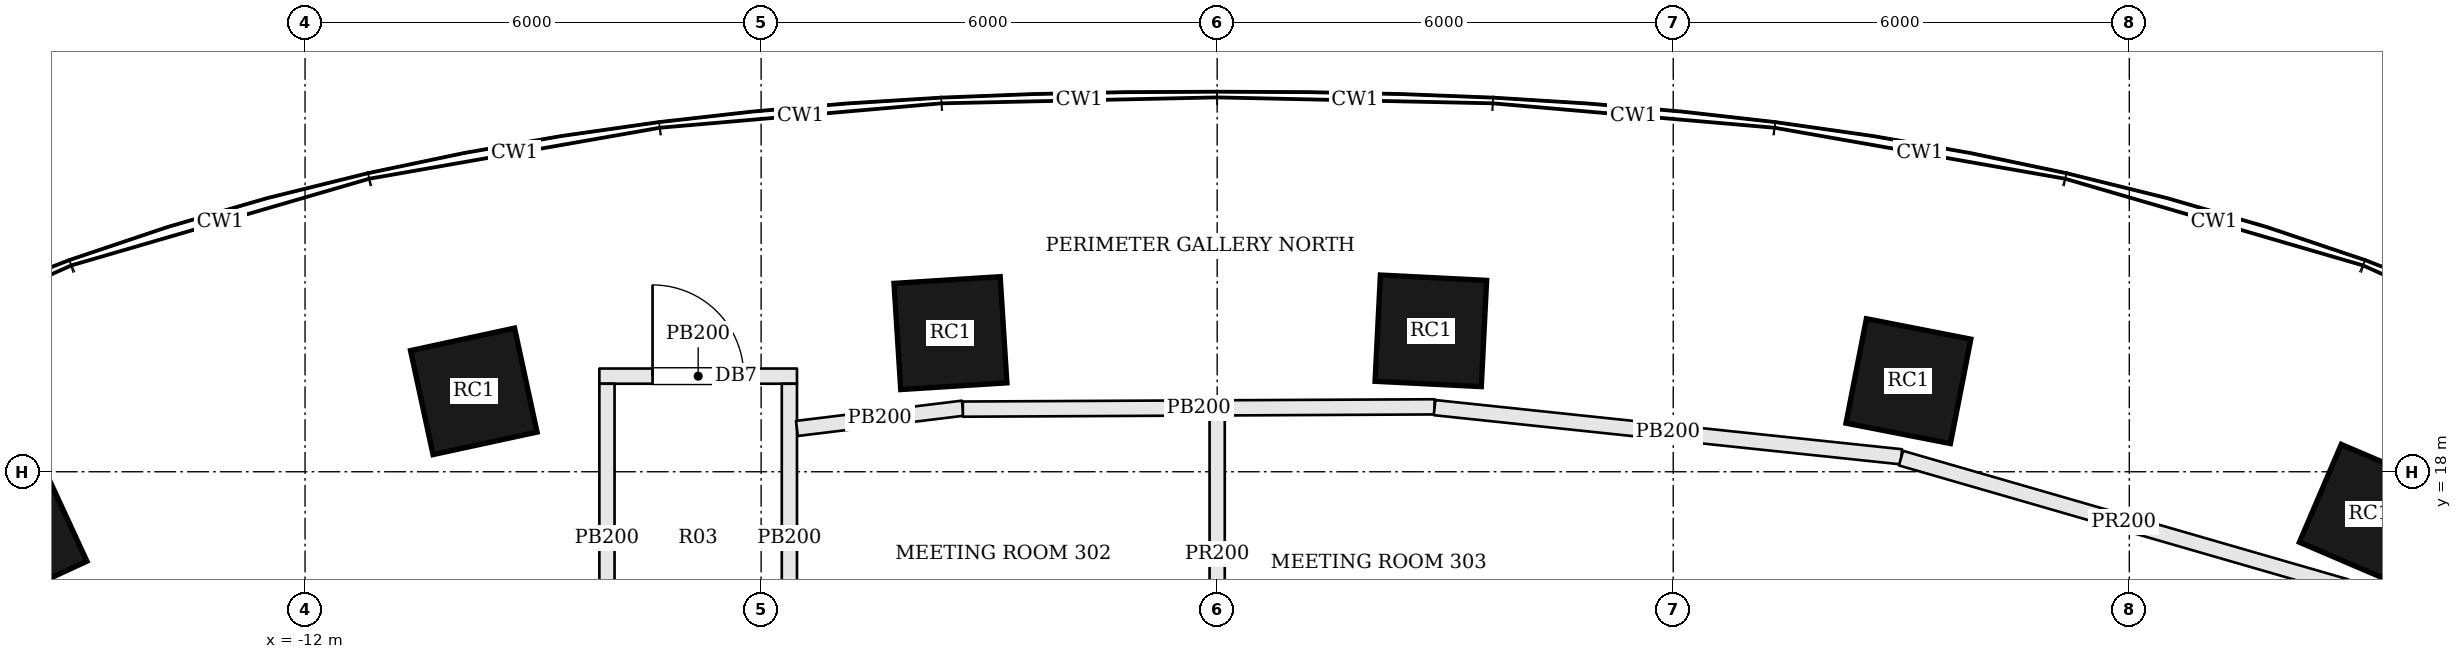
"""IFC4 building model, lengths in metres.
Left out: names, types, materials, properties, quantities, classifications, styles, units other than length and angle.
Written with IfcOpenShell. Run it as: python <this file> out.ifc"""

import sys

from ifc_helpers import new_model, si_unit, direction, frame, frame_2d, origin, origin_2d, place, context, subcontext, project, spatial, rectangle, extrude, element, fill, save


model = new_model("IFC4")
c1 = context("Model", 3, precision=1e-05, world=origin(), true_north=direction((0.0, 1.0)))
c2 = subcontext(c1, "Body", "Model", "MODEL_VIEW")
j1 = project(units=[si_unit("LENGTHUNIT", "METRE"), si_unit("PLANEANGLEUNIT", "RADIAN")], contexts=[c1])
p1 = place(None, origin())
s1 = spatial("IfcSite", under=j1, at=p1, CompositionType="ELEMENT")
p2 = place(p1, origin())
s2 = spatial("IfcBuilding", under=s1, at=p2, CompositionType="ELEMENT")
p3 = place(p2, frame((0.0, 0.0, 22.8)))
s3 = spatial("IfcBuildingStorey", under=s2, at=p3, CompositionType="ELEMENT", Elevation=22.8)
for number, where, z_axis, x_axis in (
    (1, (15.157, 17.441, 0.0), (0.0, 0.0, 1.0), (-0.919, 0.394, 0.0)),
    (2, (9.094, 19.192, 0.0), (0.0, 0.0, 1.0), (-0.981, 0.192, 0.0)),
    (3, (2.811, 19.854, 0.0), (0.0, 0.0, 1.0), (-0.999, 0.05, 0.0)),
    (4, (-3.509, 19.824, 0.0), (0.0, 0.0, 1.0), (-0.998, -0.063, 0.0)),
    (5, (-9.78, 19.058, 0.0), (0.0, 0.0, 1.0), (-0.977, -0.211, 0.0)),
    (6, (-15.799, 17.165, 0.0), (0.0, 0.0, 1.0), (-0.908, -0.419, 0.0)),
):
    element("IfcColumn", number, at=place(p3, frame(where, z_axis=z_axis, x_axis=x_axis)), inside=s3, PredefinedType="COLUMN", context=c2, shape_type="SweptSolid", body=[
        extrude(rectangle(XDim=1.4, YDim=1.4, at=origin_2d()), origin(), (0.0, 0.0, 1.0), 5.4),
    ])
p4 = place(p3, frame((-8.128, 19.258, 0.0), z_axis=(0.0, 0.0, 1.0), x_axis=(1.0, 0.0, 0.0)))
e7 = element("IfcWall", 7, at=p4, inside=s3, PredefinedType="PARTITIONING", context=c2, shape_type="SweptSolid", body=[
    extrude(rectangle(XDim=2.6, YDim=0.2, at=frame_2d((1.3, 0.0))), origin(), (0.0, 0.0, 1.0), 4.43),
])
p5 = place(p4, frame((0.7, 0.0, 0.0)))
e8 = element("IfcOpeningElement", 8, at=p5, cuts=e7, PredefinedType="OPENING", context=c2, shape_type="SweptSolid", body=[
    extrude(rectangle(XDim=1.2, YDim=2.1, at=frame_2d((0.6, 1.05))), frame((0.0, 0.11, 0.0), z_axis=(0.0, -1.0, 0.0), x_axis=(1.0, 0.0, 0.0)), (0.0, 0.0, 1.0), 0.22),
])
for number, where, z_axis, x_axis in (
    (9, (-5.628, 19.158, 0.0), (0.0, 0.0, 1.0), (0.0, -1.0, 0.0)),
    (10, (-8.028, 15.1, 0.0), (0.0, 0.0, 1.0), (0.0, 1.0, 0.0)),
):
    element("IfcWall", number, at=place(p3, frame(where, z_axis=z_axis, x_axis=x_axis)), inside=s3, PredefinedType="PARTITIONING", context=c2, shape_type="SweptSolid", body=[
        extrude(rectangle(XDim=4.058, YDim=0.2, at=frame_2d((2.029, 0.0))), origin(), (0.0, 0.0, 1.0), 4.43),
    ])
p6 = place(p3, frame((-5.529, 18.57, 0.0), z_axis=(0.0, 0.0, 1.0), x_axis=(0.992659217013, 0.120944941522, 0.0)))
e11 = element("IfcWall", 11, at=p6, inside=s3, PredefinedType="PARTITIONING", context=c2, shape_type="SweptSolid", body=[
    extrude(rectangle(XDim=2.198, YDim=0.2, at=frame_2d((1.099, 0.0))), origin(), (0.0, 0.0, 1.0), 4.43),
])
p7 = place(p3, frame((-3.346, 18.824, 0.0), z_axis=(0.0, 0.0, 1.0), x_axis=(0.999988297333, 0.004837891778, 0.0)))
e12 = element("IfcWall", 12, at=p7, inside=s3, PredefinedType="PARTITIONING", context=c2, shape_type="SweptSolid", body=[
    extrude(rectangle(XDim=6.207, YDim=0.2, at=frame_2d((3.104, 0.0))), origin(), (0.0, 0.0, 1.0), 4.43),
])
p8 = place(p3, frame((0.0, 18.741, 0.0), z_axis=(0.0, 0.0, 1.0), x_axis=(0.0, -1.0, 0.0)))
e13 = element("IfcWall", 13, at=p8, inside=s3, PredefinedType="PARTITIONING", context=c2, shape_type="SweptSolid", body=[
    extrude(rectangle(XDim=3.641, YDim=0.2, at=frame_2d((1.82, 0.0))), origin(), (0.0, 0.0, 1.0), 4.43),
])
p9 = place(p3, frame((2.86, 18.844, 0.0), z_axis=(0.0, 0.0, 1.0), x_axis=(0.994494179805, -0.10479182379, 0.0)))
e14 = element("IfcWall", 14, at=p9, inside=s3, PredefinedType="PARTITIONING", context=c2, shape_type="SweptSolid", body=[
    extrude(rectangle(XDim=6.174, YDim=0.2, at=frame_2d((3.087, 0.0))), origin(), (0.0, 0.0, 1.0), 4.43),
])
p10 = place(p3, frame((8.997, 18.179, 0.0), z_axis=(0.0, 0.0, 1.0), x_axis=(0.960743591904, -0.277437831982, 0.0)))
e15 = element("IfcWall", 15, at=p10, inside=s3, PredefinedType="PARTITIONING", context=c2, shape_type="SweptSolid", body=[
    extrude(rectangle(XDim=6.098, YDim=0.2, at=frame_2d((3.049, 0.0))), origin(), (0.0, 0.0, 1.0), 4.43),
])
p11 = place(p5, origin())
e16 = element("IfcDoor", 16, at=p11, inside=s3, OperationType="SINGLE_SWING_LEFT", PredefinedType="DOOR", context=c2, shape_type="SweptSolid", body=[
    extrude(rectangle(XDim=1.2, YDim=2.1, at=frame_2d((0.6, 1.05))), frame((0.0, 0.025, 0.0), z_axis=(0.0, -1.0, 0.0), x_axis=(1.0, 0.0, 0.0)), (0.0, 0.0, 1.0), 0.05),
])
fill(e8, e16)
save(model, sys.argv[1])
